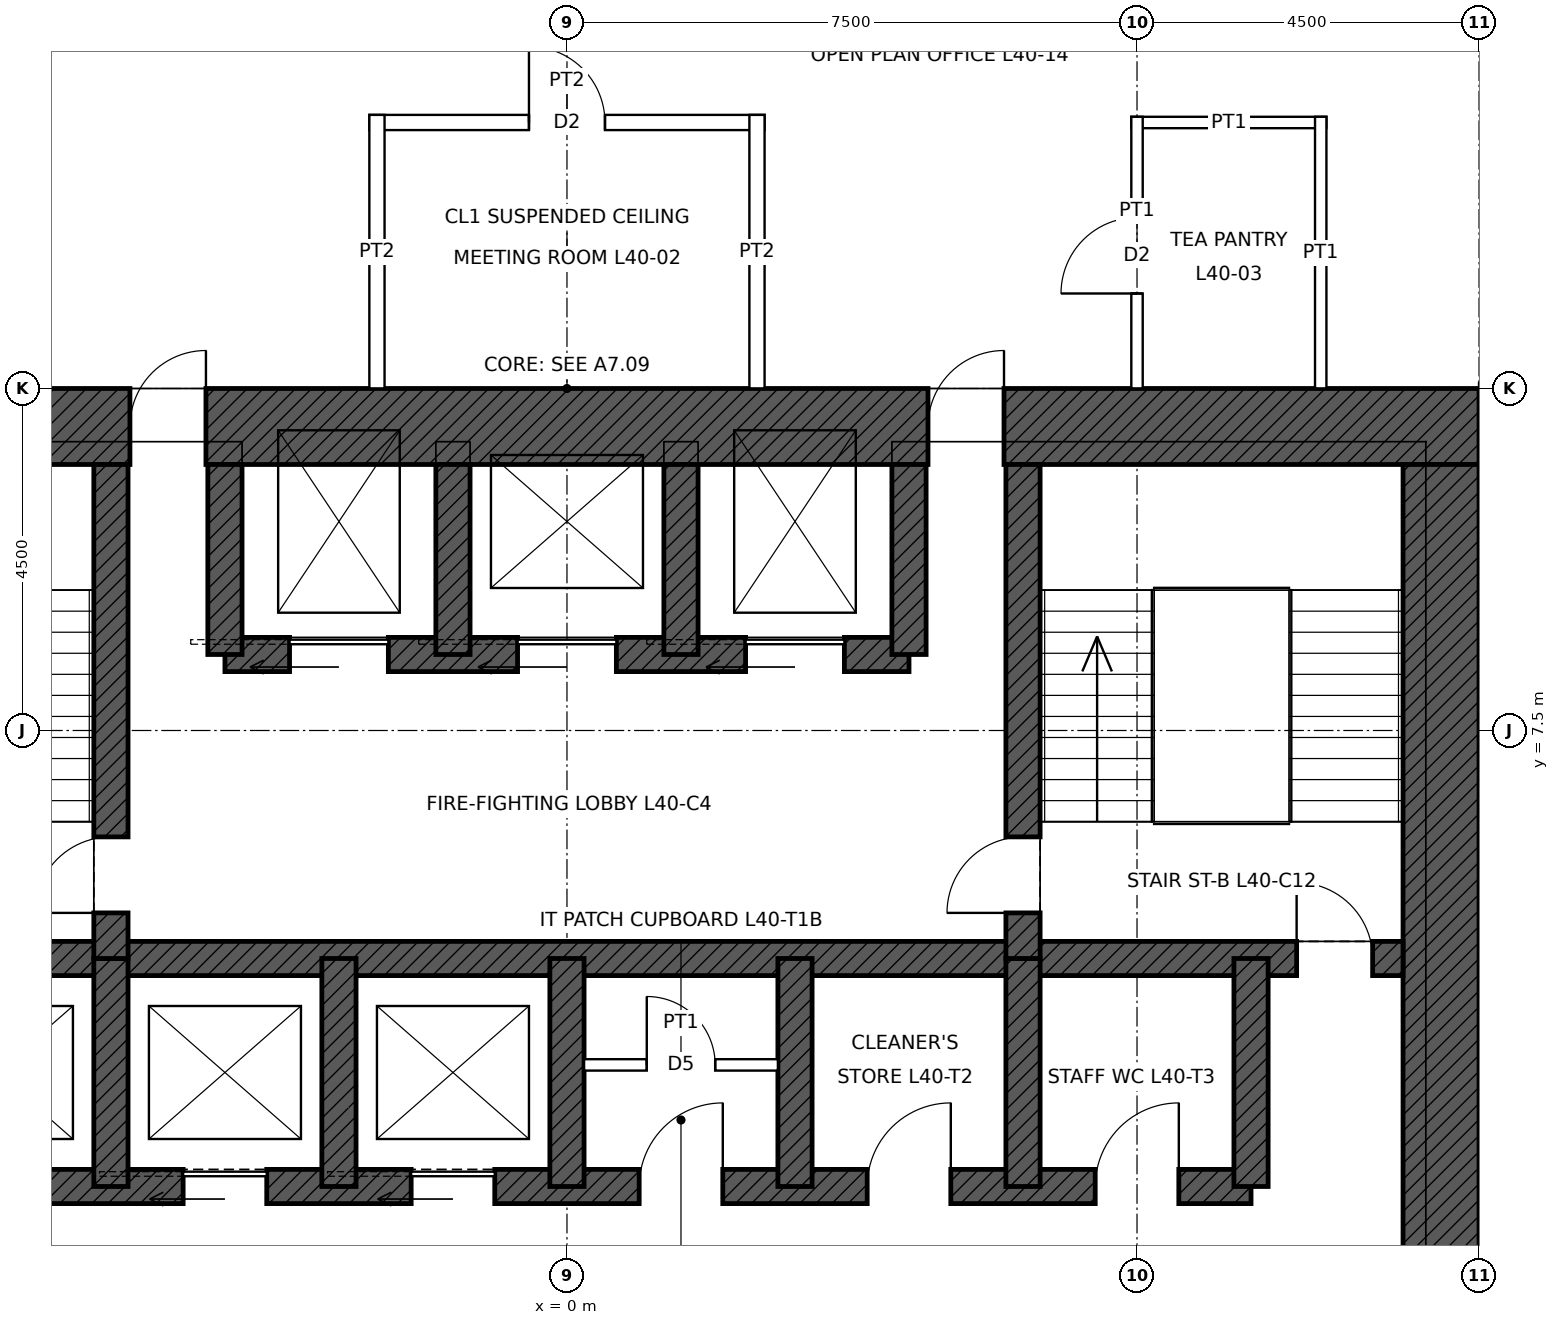
"""IFC4 building model, lengths in metres.
Left out: names, types, materials, properties, quantities, classifications, styles, units other than length and angle.
Written with IfcOpenShell. Run it as: python <this file> out.ifc"""

import sys

from ifc_helpers import new_model, si_unit, direction, frame, frame_2d, origin, place, context, subcontext, project, spatial, rectangle, extrude, element, fill, save


model = new_model("IFC4")
c1 = context("Model", 3, precision=1e-05, world=origin(), true_north=direction((0.0, 1.0)))
c2 = subcontext(c1, "Body", "Model", "MODEL_VIEW")
j1 = project(units=[si_unit("LENGTHUNIT", "METRE"), si_unit("PLANEANGLEUNIT", "RADIAN")], contexts=[c1])
p1 = place(None, origin())
s1 = spatial("IfcSite", under=j1, at=p1, CompositionType="ELEMENT")
p2 = place(p1, origin())
s2 = spatial("IfcBuilding", under=s1, at=p2, CompositionType="ELEMENT")
p3 = place(p2, frame((0.0, 0.0, 193.9)))
s3 = spatial("IfcBuildingStorey", under=s2, at=p3, CompositionType="ELEMENT", Elevation=193.9)
p4 = place(p3, frame((-12.0, 11.5, 0.0), z_axis=(0.0, 0.0, 1.0), x_axis=(1.0, 0.0, 0.0)))
e1 = element("IfcWall", 1, at=p4, inside=s3, PredefinedType="SHEAR", context=c2, shape_type="SweptSolid", body=[
    extrude(rectangle(XDim=24.0, YDim=1.0, at=frame_2d((12.0, 0.0))), origin(), (0.0, 0.0, 1.0), 4.0),
])
p5 = place(p4, frame((6.25, 0.0, 0.0)))
e2 = element("IfcOpeningElement", 2, at=p5, cuts=e1, PredefinedType="OPENING", context=c2, shape_type="SweptSolid", body=[
    extrude(rectangle(XDim=1.0, YDim=2.4, at=frame_2d((0.5, 1.2))), frame((0.0, 0.51, 0.0), z_axis=(0.0, -1.0, 0.0), x_axis=(1.0, 0.0, 0.0)), (0.0, 0.0, 1.0), 1.02),
])
p6 = place(p4, frame((16.75, 0.0, 0.0)))
e3 = element("IfcOpeningElement", 3, at=p6, cuts=e1, PredefinedType="OPENING", context=c2, shape_type="SweptSolid", body=[
    extrude(rectangle(XDim=1.0, YDim=2.4, at=frame_2d((0.5, 1.2))), frame((0.0, 0.51, 0.0), z_axis=(0.0, -1.0, 0.0), x_axis=(1.0, 0.0, 0.0)), (0.0, 0.0, 1.0), 1.02),
])
p7 = place(p3, frame((11.5, 11.0, 0.0), z_axis=(0.0, 0.0, 1.0), x_axis=(0.0, -1.0, 0.0)))
e4 = element("IfcWall", 4, at=p7, inside=s3, PredefinedType="SHEAR", context=c2, shape_type="SweptSolid", body=[
    extrude(rectangle(XDim=22.0, YDim=1.0, at=frame_2d((11.0, 0.0))), origin(), (0.0, 0.0, 1.0), 4.0),
])
p8 = place(p7, frame((10.5, 0.0, 0.0)))
e5 = element("IfcOpeningElement", 5, at=p8, cuts=e4, PredefinedType="OPENING", context=c2, shape_type="SweptSolid", body=[
    extrude(rectangle(XDim=1.0, YDim=2.4, at=frame_2d((0.5, 1.2))), frame((0.0, 0.51, 0.0), z_axis=(0.0, -1.0, 0.0), x_axis=(1.0, 0.0, 0.0)), (0.0, 0.0, 1.0), 1.02),
])
p9 = place(p3, frame((-11.0, 4.5, 0.0), z_axis=(0.0, 0.0, 1.0), x_axis=(1.0, 0.0, 0.0)))
e6 = element("IfcWall", 6, at=p9, inside=s3, PredefinedType="SHEAR", context=c2, shape_type="SweptSolid", body=[
    extrude(rectangle(XDim=22.0, YDim=0.45, at=frame_2d((11.0, 0.0))), origin(), (0.0, 0.0, 1.0), 4.0),
])
p10 = place(p9, frame((0.4, 0.0, 0.0)))
e7 = element("IfcOpeningElement", 7, at=p10, cuts=e6, PredefinedType="OPENING", context=c2, shape_type="SweptSolid", body=[
    extrude(rectangle(XDim=1.0, YDim=2.1, at=frame_2d((0.5, 1.05))), frame((0.0, 0.235, 0.0), z_axis=(0.0, -1.0, 0.0), x_axis=(1.0, 0.0, 0.0)), (0.0, 0.0, 1.0), 0.47),
])
p11 = place(p9, frame((20.6, 0.0, 0.0)))
e8 = element("IfcOpeningElement", 8, at=p11, cuts=e6, PredefinedType="OPENING", context=c2, shape_type="SweptSolid", body=[
    extrude(rectangle(XDim=1.0, YDim=2.1, at=frame_2d((0.5, 1.05))), frame((0.0, 0.235, 0.0), z_axis=(0.0, -1.0, 0.0), x_axis=(1.0, 0.0, 0.0)), (0.0, 0.0, 1.0), 0.47),
])
p12 = place(p3, frame((-9.0, 1.5, 0.0), z_axis=(0.0, 0.0, 1.0), x_axis=(1.0, 0.0, 0.0)))
e9 = element("IfcWall", 9, at=p12, inside=s3, PredefinedType="SHEAR", context=c2, shape_type="SweptSolid", body=[
    extrude(rectangle(XDim=18.0, YDim=0.45, at=frame_2d((9.0, 0.0))), origin(), (0.0, 0.0, 1.0), 4.0),
])
p13 = place(p12, frame((0.95, 0.0, 0.0)))
e10 = element("IfcOpeningElement", 10, at=p13, cuts=e9, PredefinedType="OPENING", context=c2, shape_type="SweptSolid", body=[
    extrude(rectangle(XDim=1.1, YDim=2.1, at=frame_2d((0.55, 1.05))), frame((0.0, 0.235, 0.0), z_axis=(0.0, -1.0, 0.0), x_axis=(1.0, 0.0, 0.0)), (0.0, 0.0, 1.0), 0.47),
])
p14 = place(p12, frame((3.95, 0.0, 0.0)))
e11 = element("IfcOpeningElement", 11, at=p14, cuts=e9, PredefinedType="OPENING", context=c2, shape_type="SweptSolid", body=[
    extrude(rectangle(XDim=1.1, YDim=2.1, at=frame_2d((0.55, 1.05))), frame((0.0, 0.235, 0.0), z_axis=(0.0, -1.0, 0.0), x_axis=(1.0, 0.0, 0.0)), (0.0, 0.0, 1.0), 0.47),
])
p15 = place(p12, frame((6.95, 0.0, 0.0)))
e12 = element("IfcOpeningElement", 12, at=p15, cuts=e9, PredefinedType="OPENING", context=c2, shape_type="SweptSolid", body=[
    extrude(rectangle(XDim=1.1, YDim=2.1, at=frame_2d((0.55, 1.05))), frame((0.0, 0.235, 0.0), z_axis=(0.0, -1.0, 0.0), x_axis=(1.0, 0.0, 0.0)), (0.0, 0.0, 1.0), 0.47),
])
p16 = place(p12, frame((9.95, 0.0, 0.0)))
e13 = element("IfcOpeningElement", 13, at=p16, cuts=e9, PredefinedType="OPENING", context=c2, shape_type="SweptSolid", body=[
    extrude(rectangle(XDim=1.1, YDim=2.1, at=frame_2d((0.55, 1.05))), frame((0.0, 0.235, 0.0), z_axis=(0.0, -1.0, 0.0), x_axis=(1.0, 0.0, 0.0)), (0.0, 0.0, 1.0), 0.47),
])
p17 = place(p12, frame((12.95, 0.0, 0.0)))
e14 = element("IfcOpeningElement", 14, at=p17, cuts=e9, PredefinedType="OPENING", context=c2, shape_type="SweptSolid", body=[
    extrude(rectangle(XDim=1.1, YDim=2.1, at=frame_2d((0.55, 1.05))), frame((0.0, 0.235, 0.0), z_axis=(0.0, -1.0, 0.0), x_axis=(1.0, 0.0, 0.0)), (0.0, 0.0, 1.0), 0.47),
])
p18 = place(p12, frame((15.95, 0.0, 0.0)))
e15 = element("IfcOpeningElement", 15, at=p18, cuts=e9, PredefinedType="OPENING", context=c2, shape_type="SweptSolid", body=[
    extrude(rectangle(XDim=1.1, YDim=2.1, at=frame_2d((0.55, 1.05))), frame((0.0, 0.235, 0.0), z_axis=(0.0, -1.0, 0.0), x_axis=(1.0, 0.0, 0.0)), (0.0, 0.0, 1.0), 0.47),
])
p19 = place(p3, frame((-4.5, 8.5, 0.0), z_axis=(0.0, 0.0, 1.0), x_axis=(1.0, 0.0, 0.0)))
e16 = element("IfcWall", 16, at=p19, inside=s3, PredefinedType="SHEAR", context=c2, shape_type="SweptSolid", body=[
    extrude(rectangle(XDim=9.0, YDim=0.45, at=frame_2d((4.5, 0.0))), origin(), (0.0, 0.0, 1.0), 4.0),
])
p20 = place(p19, frame((0.85, 0.0, 0.0)))
e17 = element("IfcOpeningElement", 17, at=p20, cuts=e16, PredefinedType="OPENING", context=c2, shape_type="SweptSolid", body=[
    extrude(rectangle(XDim=1.3, YDim=2.4, at=frame_2d((0.65, 1.2))), frame((0.0, 0.235, 0.0), z_axis=(0.0, -1.0, 0.0), x_axis=(1.0, 0.0, 0.0)), (0.0, 0.0, 1.0), 0.47),
])
p21 = place(p19, frame((6.85, 0.0, 0.0)))
e18 = element("IfcOpeningElement", 18, at=p21, cuts=e16, PredefinedType="OPENING", context=c2, shape_type="SweptSolid", body=[
    extrude(rectangle(XDim=1.3, YDim=2.4, at=frame_2d((0.65, 1.2))), frame((0.0, 0.235, 0.0), z_axis=(0.0, -1.0, 0.0), x_axis=(1.0, 0.0, 0.0)), (0.0, 0.0, 1.0), 0.47),
])
p22 = place(p19, frame((3.85, 0.0, 0.0)))
e19 = element("IfcOpeningElement", 19, at=p22, cuts=e16, PredefinedType="OPENING", context=c2, shape_type="SweptSolid", body=[
    extrude(rectangle(XDim=1.3, YDim=2.4, at=frame_2d((0.65, 1.2))), frame((0.0, 0.235, 0.0), z_axis=(0.0, -1.0, 0.0), x_axis=(1.0, 0.0, 0.0)), (0.0, 0.0, 1.0), 0.47),
])
for number, where, z_axis, x_axis in (
    (20, (9.0, 1.5, 0.0), (0.0, 0.0, 1.0), (0.0, 1.0, 0.0)),
    (21, (-6.0, 1.5, 0.0), (0.0, 0.0, 1.0), (0.0, 1.0, 0.0)),
    (22, (-3.0, 1.5, 0.0), (0.0, 0.0, 1.0), (0.0, 1.0, 0.0)),
    (23, (0.0, 1.5, 0.0), (0.0, 0.0, 1.0), (0.0, 1.0, 0.0)),
    (24, (3.0, 1.5, 0.0), (0.0, 0.0, 1.0), (0.0, 1.0, 0.0)),
    (25, (6.0, 1.5, 0.0), (0.0, 0.0, 1.0), (0.0, 1.0, 0.0)),
):
    element("IfcWall", number, at=place(p3, frame(where, z_axis=z_axis, x_axis=x_axis)), inside=s3, PredefinedType="SHEAR", context=c2, shape_type="SweptSolid", body=[
        extrude(rectangle(XDim=3.0, YDim=0.45, at=frame_2d((1.5, 0.0))), origin(), (0.0, 0.0, 1.0), 4.0),
    ])
p23 = place(p3, frame((-6.0, 4.5, 0.0), z_axis=(0.0, 0.0, 1.0), x_axis=(0.0, 1.0, 0.0)))
e26 = element("IfcWall", 26, at=p23, inside=s3, PredefinedType="SHEAR", context=c2, shape_type="SweptSolid", body=[
    extrude(rectangle(XDim=6.5, YDim=0.45, at=frame_2d((3.25, 0.0))), origin(), (0.0, 0.0, 1.0), 4.0),
])
p24 = place(p23, frame((0.6, 0.0, 0.0)))
e27 = element("IfcOpeningElement", 27, at=p24, cuts=e26, PredefinedType="OPENING", context=c2, shape_type="SweptSolid", body=[
    extrude(rectangle(XDim=1.0, YDim=2.1, at=frame_2d((0.5, 1.05))), frame((0.0, 0.235, 0.0), z_axis=(0.0, -1.0, 0.0), x_axis=(1.0, 0.0, 0.0)), (0.0, 0.0, 1.0), 0.47),
])
p25 = place(p3, frame((6.0, 4.5, 0.0), z_axis=(0.0, 0.0, 1.0), x_axis=(0.0, 1.0, 0.0)))
e28 = element("IfcWall", 28, at=p25, inside=s3, PredefinedType="SHEAR", context=c2, shape_type="SweptSolid", body=[
    extrude(rectangle(XDim=6.5, YDim=0.45, at=frame_2d((3.25, 0.0))), origin(), (0.0, 0.0, 1.0), 4.0),
])
p26 = place(p25, frame((0.6, 0.0, 0.0)))
e29 = element("IfcOpeningElement", 29, at=p26, cuts=e28, PredefinedType="OPENING", context=c2, shape_type="SweptSolid", body=[
    extrude(rectangle(XDim=1.0, YDim=2.1, at=frame_2d((0.5, 1.05))), frame((0.0, 0.235, 0.0), z_axis=(0.0, -1.0, 0.0), x_axis=(1.0, 0.0, 0.0)), (0.0, 0.0, 1.0), 0.47),
])
for number, where, z_axis, x_axis in (
    (30, (-4.5, 8.5, 0.0), (0.0, 0.0, 1.0), (0.0, 1.0, 0.0)),
    (31, (4.5, 8.5, 0.0), (0.0, 0.0, 1.0), (0.0, 1.0, 0.0)),
    (32, (-1.5, 8.5, 0.0), (0.0, 0.0, 1.0), (0.0, 1.0, 0.0)),
    (33, (1.5, 8.5, 0.0), (0.0, 0.0, 1.0), (0.0, 1.0, 0.0)),
):
    element("IfcWall", number, at=place(p3, frame(where, z_axis=z_axis, x_axis=x_axis)), inside=s3, PredefinedType="SHEAR", context=c2, shape_type="SweptSolid", body=[
        extrude(rectangle(XDim=2.5, YDim=0.45, at=frame_2d((1.25, 0.0))), origin(), (0.0, 0.0, 1.0), 4.0),
    ])
p27 = place(p3, frame((-2.6, 15.5, 0.0), z_axis=(0.0, 0.0, 1.0), x_axis=(1.0, 0.0, 0.0)))
e34 = element("IfcWall", 34, at=p27, inside=s3, PredefinedType="PARTITIONING", context=c2, shape_type="SweptSolid", body=[
    extrude(rectangle(XDim=5.2, YDim=0.2, at=frame_2d((2.6, 0.0))), origin(), (0.0, 0.0, 1.0), 3.85),
])
p28 = place(p27, frame((2.1, 0.0, 0.0)))
e35 = element("IfcOpeningElement", 35, at=p28, cuts=e34, PredefinedType="OPENING", context=c2, shape_type="SweptSolid", body=[
    extrude(rectangle(XDim=1.0, YDim=2.1, at=frame_2d((0.5, 1.05))), frame((0.0, 0.11, 0.0), z_axis=(0.0, -1.0, 0.0), x_axis=(1.0, 0.0, 0.0)), (0.0, 0.0, 1.0), 0.22),
])
p29 = place(p3, frame((7.425, 15.5, 0.0), z_axis=(0.0, 0.0, 1.0), x_axis=(1.0, 0.0, 0.0)))
e36 = element("IfcWall", 36, at=p29, inside=s3, PredefinedType="PARTITIONING", context=c2, shape_type="SweptSolid", body=[
    extrude(rectangle(XDim=2.567, YDim=0.15, at=frame_2d((1.283, 0.0))), origin(), (0.0, 0.0, 1.0), 3.85),
])
for number, where, z_axis, x_axis in (
    (37, (-2.5, 12.0, 0.0), (0.0, 0.0, 1.0), (0.0, 1.0, 0.0)),
    (38, (2.5, 12.0, 0.0), (0.0, 0.0, 1.0), (0.0, 1.0, 0.0)),
):
    element("IfcWall", number, at=place(p3, frame(where, z_axis=z_axis, x_axis=x_axis)), inside=s3, PredefinedType="PARTITIONING", context=c2, shape_type="SweptSolid", body=[
        extrude(rectangle(XDim=3.6, YDim=0.2, at=frame_2d((1.8, 0.0))), origin(), (0.0, 0.0, 1.0), 3.85),
    ])
p30 = place(p3, frame((7.5, 12.0, 0.0), z_axis=(0.0, 0.0, 1.0), x_axis=(0.0, 1.0, 0.0)))
e39 = element("IfcWall", 39, at=p30, inside=s3, PredefinedType="PARTITIONING", context=c2, shape_type="SweptSolid", body=[
    extrude(rectangle(XDim=3.575, YDim=0.15, at=frame_2d((1.788, 0.0))), origin(), (0.0, 0.0, 1.0), 3.238),
])
p31 = place(p30, frame((1.25, 0.0, 0.0)))
e40 = element("IfcOpeningElement", 40, at=p31, cuts=e39, PredefinedType="OPENING", context=c2, shape_type="SweptSolid", body=[
    extrude(rectangle(XDim=1.0, YDim=2.1, at=frame_2d((0.5, 1.05))), frame((0.0, 0.085, 0.0), z_axis=(0.0, -1.0, 0.0), x_axis=(1.0, 0.0, 0.0)), (0.0, 0.0, 1.0), 0.17),
])
p32 = place(p3, frame((9.917, 12.0, 0.0), z_axis=(0.0, 0.0, 1.0), x_axis=(0.0, 1.0, 0.0)))
e41 = element("IfcWall", 41, at=p32, inside=s3, PredefinedType="PARTITIONING", context=c2, shape_type="SweptSolid", body=[
    extrude(rectangle(XDim=3.575, YDim=0.15, at=frame_2d((1.788, 0.0))), origin(), (0.0, 0.0, 1.0), 3.85),
])
p33 = place(p3, frame((0.225, 3.1, 0.0), z_axis=(0.0, 0.0, 1.0), x_axis=(1.0, 0.0, 0.0)))
e42 = element("IfcWall", 42, at=p33, inside=s3, PredefinedType="PARTITIONING", context=c2, shape_type="SweptSolid", body=[
    extrude(rectangle(XDim=2.55, YDim=0.15, at=frame_2d((1.275, 0.0))), origin(), (0.0, 0.0, 1.0), 3.75),
])
p34 = place(p33, frame((0.825, 0.0, 0.0)))
e43 = element("IfcOpeningElement", 43, at=p34, cuts=e42, PredefinedType="OPENING", context=c2, shape_type="SweptSolid", body=[
    extrude(rectangle(XDim=0.9, YDim=2.1, at=frame_2d((0.45, 1.05))), frame((0.0, 0.085, 0.0), z_axis=(0.0, -1.0, 0.0), x_axis=(1.0, 0.0, 0.0)), (0.0, 0.0, 1.0), 0.17),
])
p35 = place(p11, origin())
e44 = element("IfcDoor", 44, at=p35, inside=s3, OperationType="SINGLE_SWING_LEFT", PredefinedType="DOOR", context=c2, shape_type="SweptSolid", body=[
    extrude(rectangle(XDim=1.0, YDim=2.1, at=frame_2d((0.5, 1.05))), frame((0.0, 0.025, 0.0), z_axis=(0.0, -1.0, 0.0), x_axis=(1.0, 0.0, 0.0)), (0.0, 0.0, 1.0), 0.05),
])
fill(e8, e44)
p36 = place(p24, origin())
e45 = element("IfcDoor", 45, at=p36, inside=s3, OperationType="SINGLE_SWING_LEFT", PredefinedType="DOOR", context=c2, shape_type="SweptSolid", body=[
    extrude(rectangle(XDim=1.0, YDim=2.1, at=frame_2d((0.5, 1.05))), frame((0.0, 0.025, 0.0), z_axis=(0.0, -1.0, 0.0), x_axis=(1.0, 0.0, 0.0)), (0.0, 0.0, 1.0), 0.05),
])
fill(e27, e45)
p37 = place(p26, origin())
e46 = element("IfcDoor", 46, at=p37, inside=s3, OperationType="SINGLE_SWING_LEFT", PredefinedType="DOOR", context=c2, shape_type="SweptSolid", body=[
    extrude(rectangle(XDim=1.0, YDim=2.1, at=frame_2d((0.5, 1.05))), frame((0.0, 0.025, 0.0), z_axis=(0.0, -1.0, 0.0), x_axis=(1.0, 0.0, 0.0)), (0.0, 0.0, 1.0), 0.05),
])
fill(e29, e46)
p38 = place(p5, origin())
e47 = element("IfcDoor", 47, at=p38, inside=s3, OperationType="SINGLE_SWING_RIGHT", PredefinedType="DOOR", context=c2, shape_type="SweptSolid", body=[
    extrude(rectangle(XDim=1.0, YDim=2.4, at=frame_2d((0.5, 1.2))), frame((0.0, 0.485, 0.0), z_axis=(0.0, -1.0, 0.0), x_axis=(1.0, 0.0, 0.0)), (0.0, 0.0, 1.0), 0.05),
])
fill(e2, e47)
p39 = place(p6, origin())
e48 = element("IfcDoor", 48, at=p39, inside=s3, OperationType="SINGLE_SWING_RIGHT", PredefinedType="DOOR", context=c2, shape_type="SweptSolid", body=[
    extrude(rectangle(XDim=1.0, YDim=2.4, at=frame_2d((0.5, 1.2))), frame((0.0, 0.485, 0.0), z_axis=(0.0, -1.0, 0.0), x_axis=(1.0, 0.0, 0.0)), (0.0, 0.0, 1.0), 0.05),
])
fill(e3, e48)
p40 = place(p20, origin())
e49 = element("IfcDoor", 49, at=p40, inside=s3, OperationType="SLIDING_TO_LEFT", PredefinedType="DOOR", context=c2, shape_type="SweptSolid", body=[
    extrude(rectangle(XDim=1.3, YDim=2.4, at=frame_2d((0.65, 1.2))), frame((0.0, 0.025, 0.0), z_axis=(0.0, -1.0, 0.0), x_axis=(1.0, 0.0, 0.0)), (0.0, 0.0, 1.0), 0.05),
])
fill(e17, e49)
p41 = place(p21, origin())
e50 = element("IfcDoor", 50, at=p41, inside=s3, OperationType="SLIDING_TO_LEFT", PredefinedType="DOOR", context=c2, shape_type="SweptSolid", body=[
    extrude(rectangle(XDim=1.3, YDim=2.4, at=frame_2d((0.65, 1.2))), frame((0.0, 0.025, 0.0), z_axis=(0.0, -1.0, 0.0), x_axis=(1.0, 0.0, 0.0)), (0.0, 0.0, 1.0), 0.05),
])
fill(e18, e50)
p42 = place(p22, origin())
e51 = element("IfcDoor", 51, at=p42, inside=s3, OperationType="SLIDING_TO_LEFT", PredefinedType="DOOR", context=c2, shape_type="SweptSolid", body=[
    extrude(rectangle(XDim=1.3, YDim=2.4, at=frame_2d((0.65, 1.2))), frame((0.0, 0.025, 0.0), z_axis=(0.0, -1.0, 0.0), x_axis=(1.0, 0.0, 0.0)), (0.0, 0.0, 1.0), 0.05),
])
fill(e19, e51)
p43 = place(p14, origin())
e52 = element("IfcDoor", 52, at=p43, inside=s3, OperationType="SLIDING_TO_LEFT", PredefinedType="DOOR", context=c2, shape_type="SweptSolid", body=[
    extrude(rectangle(XDim=1.1, YDim=2.1, at=frame_2d((0.55, 1.05))), frame((0.0, 0.025, 0.0), z_axis=(0.0, -1.0, 0.0), x_axis=(1.0, 0.0, 0.0)), (0.0, 0.0, 1.0), 0.05),
])
fill(e11, e52)
p44 = place(p15, origin())
e53 = element("IfcDoor", 53, at=p44, inside=s3, OperationType="SLIDING_TO_LEFT", PredefinedType="DOOR", context=c2, shape_type="SweptSolid", body=[
    extrude(rectangle(XDim=1.1, YDim=2.1, at=frame_2d((0.55, 1.05))), frame((0.0, 0.025, 0.0), z_axis=(0.0, -1.0, 0.0), x_axis=(1.0, 0.0, 0.0)), (0.0, 0.0, 1.0), 0.05),
])
fill(e12, e53)
p45 = place(p16, origin())
e54 = element("IfcDoor", 54, at=p45, inside=s3, OperationType="SINGLE_SWING_RIGHT", PredefinedType="DOOR", context=c2, shape_type="SweptSolid", body=[
    extrude(rectangle(XDim=1.1, YDim=2.1, at=frame_2d((0.55, 1.05))), frame((0.0, 0.025, 0.0), z_axis=(0.0, -1.0, 0.0), x_axis=(1.0, 0.0, 0.0)), (0.0, 0.0, 1.0), 0.05),
])
fill(e13, e54)
p46 = place(p34, origin())
e55 = element("IfcDoor", 55, at=p46, inside=s3, OperationType="SINGLE_SWING_LEFT", PredefinedType="DOOR", context=c2, shape_type="SweptSolid", body=[
    extrude(rectangle(XDim=0.9, YDim=2.1, at=frame_2d((0.45, 1.05))), frame((0.0, 0.025, 0.0), z_axis=(0.0, -1.0, 0.0), x_axis=(1.0, 0.0, 0.0)), (0.0, 0.0, 1.0), 0.05),
])
fill(e43, e55)
p47 = place(p17, origin())
e56 = element("IfcDoor", 56, at=p47, inside=s3, OperationType="SINGLE_SWING_RIGHT", PredefinedType="DOOR", context=c2, shape_type="SweptSolid", body=[
    extrude(rectangle(XDim=1.1, YDim=2.1, at=frame_2d((0.55, 1.05))), frame((0.0, 0.025, 0.0), z_axis=(0.0, -1.0, 0.0), x_axis=(1.0, 0.0, 0.0)), (0.0, 0.0, 1.0), 0.05),
])
fill(e14, e56)
p48 = place(p18, origin())
e57 = element("IfcDoor", 57, at=p48, inside=s3, OperationType="SINGLE_SWING_RIGHT", PredefinedType="DOOR", context=c2, shape_type="SweptSolid", body=[
    extrude(rectangle(XDim=1.1, YDim=2.1, at=frame_2d((0.55, 1.05))), frame((0.0, 0.025, 0.0), z_axis=(0.0, -1.0, 0.0), x_axis=(1.0, 0.0, 0.0)), (0.0, 0.0, 1.0), 0.05),
])
fill(e15, e57)
p49 = place(p28, origin())
e58 = element("IfcDoor", 58, at=p49, inside=s3, OperationType="SINGLE_SWING_LEFT", PredefinedType="DOOR", context=c2, shape_type="SweptSolid", body=[
    extrude(rectangle(XDim=1.0, YDim=2.1, at=frame_2d((0.5, 1.05))), frame((0.0, 0.025, 0.0), z_axis=(0.0, -1.0, 0.0), x_axis=(1.0, 0.0, 0.0)), (0.0, 0.0, 1.0), 0.05),
])
fill(e35, e58)
p50 = place(p31, origin())
e59 = element("IfcDoor", 59, at=p50, inside=s3, OperationType="SINGLE_SWING_LEFT", PredefinedType="DOOR", context=c2, shape_type="SweptSolid", body=[
    extrude(rectangle(XDim=1.0, YDim=2.1, at=frame_2d((0.5, 1.05))), frame((0.0, 0.025, 0.0), z_axis=(0.0, -1.0, 0.0), x_axis=(1.0, 0.0, 0.0)), (0.0, 0.0, 1.0), 0.05),
])
fill(e40, e59)
save(model, sys.argv[1])
